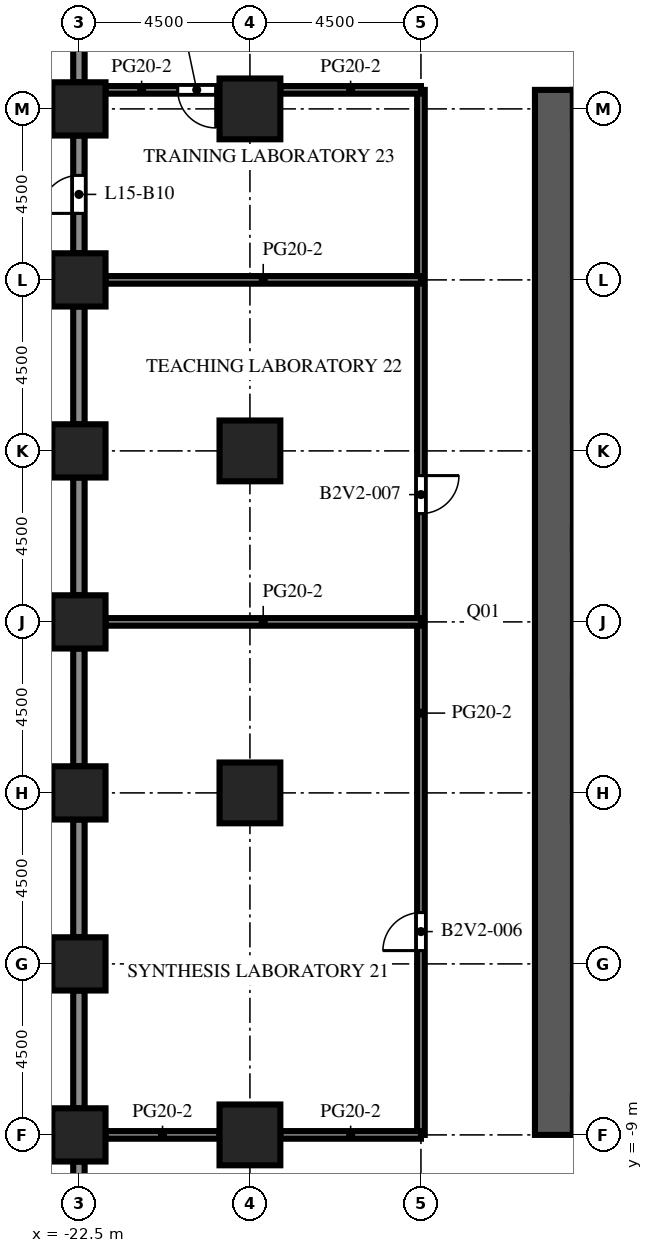
"""IFC4 building model, lengths in metres.
Left out: names, types, materials, properties, quantities, classifications, styles, units other than length and angle.
Written with IfcOpenShell. Run it as: python <this file> out.ifc"""

import sys

from ifc_helpers import new_model, si_unit, direction, frame, frame_2d, origin, origin_2d, place, context, subcontext, project, spatial, rectangle, extrude, element, fill, save


model = new_model("IFC4")
c1 = context("Model", 3, precision=1e-05, world=origin(), true_north=direction((0.0, 1.0)))
c2 = subcontext(c1, "Body", "Model", "MODEL_VIEW")
j1 = project(units=[si_unit("LENGTHUNIT", "METRE"), si_unit("PLANEANGLEUNIT", "RADIAN")], contexts=[c1])
p1 = place(None, origin())
s1 = spatial("IfcSite", under=j1, at=p1, CompositionType="ELEMENT")
p2 = place(p1, origin())
s2 = spatial("IfcBuilding", under=s1, at=p2, CompositionType="ELEMENT")
p3 = place(p2, frame((0.0, 0.0, 66.5)))
s3 = spatial("IfcBuildingStorey", under=s2, at=p3, CompositionType="ELEMENT", Elevation=66.5)
for number, where, z_axis, x_axis in (
    (1, (-22.5, -9.0, 0.0), (0.0, 0.0, 1.0), (1.0, 0.0, 0.0)),
    (2, (-22.5, -4.5, 0.0), (0.0, 0.0, 1.0), (1.0, 0.0, 0.0)),
    (3, (-22.5, 0.0, 0.0), (0.0, 0.0, 1.0), (1.0, 0.0, 0.0)),
    (4, (-22.5, 4.5, 0.0), (0.0, 0.0, 1.0), (1.0, 0.0, 0.0)),
    (5, (-22.5, 9.0, 0.0), (0.0, 0.0, 1.0), (1.0, 0.0, 0.0)),
    (6, (-22.5, 13.5, 0.0), (0.0, 0.0, 1.0), (1.0, 0.0, 0.0)),
    (7, (-22.5, 18.0, 0.0), (0.0, 0.0, 1.0), (1.0, 0.0, 0.0)),
):
    element("IfcColumn", number, at=place(p3, frame(where, z_axis=z_axis, x_axis=x_axis)), inside=s3, PredefinedType="COLUMN", context=c2, shape_type="SweptSolid", body=[
        extrude(rectangle(XDim=1.4, YDim=1.4, at=origin_2d()), origin(), (0.0, 0.0, 1.0), 4.1),
    ])
for number, where, z_axis, x_axis in (
    (8, (-18.0, -9.0, 0.0), (0.0, 0.0, 1.0), (1.0, 0.0, 0.0)),
    (9, (-18.0, 0.0, 0.0), (0.0, 0.0, 1.0), (1.0, 0.0, 0.0)),
    (10, (-18.0, 9.0, 0.0), (0.0, 0.0, 1.0), (1.0, 0.0, 0.0)),
    (11, (-18.0, 18.0, 0.0), (0.0, 0.0, 1.0), (1.0, 0.0, 0.0)),
):
    element("IfcColumn", number, at=place(p3, frame(where, z_axis=z_axis, x_axis=x_axis)), inside=s3, PredefinedType="COLUMN", context=c2, shape_type="SweptSolid", body=[
        extrude(rectangle(XDim=1.6, YDim=1.6, at=origin_2d()), origin(), (0.0, 0.0, 1.0), 4.1),
    ])
p4 = place(p3, frame((-10.0, -9.0, 0.0), z_axis=(0.0, 0.0, 1.0), x_axis=(0.0, 1.0, 0.0)))
e12 = element("IfcWall", 12, at=p4, inside=s3, PredefinedType="SHEAR", context=c2, shape_type="SweptSolid", body=[
    extrude(rectangle(XDim=27.5, YDim=1.0, at=frame_2d((13.75, 0.0))), origin(), (0.0, 0.0, 1.0), 4.1),
])
p5 = place(p4, frame((12.55, 0.0, 0.0)))
e13 = element("IfcOpeningElement", 13, at=p5, cuts=e12, PredefinedType="OPENING", context=c2, shape_type="SweptSolid", body=[
    extrude(rectangle(XDim=2.4, YDim=2.4, at=frame_2d((1.2, 1.2))), frame((0.0, 0.51, 0.0), z_axis=(0.0, -1.0, 0.0), x_axis=(1.0, 0.0, 0.0)), (0.0, 0.0, 1.0), 1.02),
])
p6 = place(p4, frame((6.825, 0.0, 0.0)))
e14 = element("IfcOpeningElement", 14, at=p6, cuts=e12, PredefinedType="OPENING", context=c2, shape_type="SweptSolid", body=[
    extrude(rectangle(XDim=1.2, YDim=2.1, at=frame_2d((0.6, 1.05))), frame((0.0, 0.51, 0.0), z_axis=(0.0, -1.0, 0.0), x_axis=(1.0, 0.0, 0.0)), (0.0, 0.0, 1.0), 1.02),
])
p7 = place(p4, frame((19.475, 0.0, 0.0)))
e15 = element("IfcOpeningElement", 15, at=p7, cuts=e12, PredefinedType="OPENING", context=c2, shape_type="SweptSolid", body=[
    extrude(rectangle(XDim=1.2, YDim=2.1, at=frame_2d((0.6, 1.05))), frame((0.0, 0.51, 0.0), z_axis=(0.0, -1.0, 0.0), x_axis=(1.0, 0.0, 0.0)), (0.0, 0.0, 1.0), 1.02),
])
p8 = place(p3, frame((-22.5, 18.7, 0.0), z_axis=(0.0, 0.0, 1.0), x_axis=(0.0, 1.0, 0.0)))
e16 = element("IfcWall", 16, at=p8, inside=s3, PredefinedType="SOLIDWALL", context=c2, shape_type="SweptSolid", body=[
    extrude(rectangle(XDim=3.1, YDim=0.3, at=frame_2d((1.55, 0.0))), origin(), (0.0, 0.0, 1.0), 2.6),
])
p9 = place(p3, frame((-22.5, 14.2, 0.0), z_axis=(0.0, 0.0, 1.0), x_axis=(0.0, 1.0, 0.0)))
e17 = element("IfcWall", 17, at=p9, inside=s3, PredefinedType="SOLIDWALL", context=c2, shape_type="SweptSolid", body=[
    extrude(rectangle(XDim=3.1, YDim=0.3, at=frame_2d((1.55, 0.0))), origin(), (0.0, 0.0, 1.0), 2.6),
])
p10 = place(p9, frame((1.05, 0.0, 0.0)))
e18 = element("IfcOpeningElement", 18, at=p10, cuts=e17, PredefinedType="OPENING", context=c2, shape_type="SweptSolid", body=[
    extrude(rectangle(XDim=1.0, YDim=2.2, at=frame_2d((0.5, 1.1))), frame((0.0, 0.16, 0.0), z_axis=(0.0, -1.0, 0.0), x_axis=(1.0, 0.0, 0.0)), (0.0, 0.0, 1.0), 0.32),
])
for number, where, z_axis, x_axis in (
    (19, (-22.5, 9.7, 0.0), (0.0, 0.0, 1.0), (0.0, 1.0, 0.0)),
    (20, (-22.5, 5.2, 0.0), (0.0, 0.0, 1.0), (0.0, 1.0, 0.0)),
    (21, (-22.5, 0.7, 0.0), (0.0, 0.0, 1.0), (0.0, 1.0, 0.0)),
    (22, (-22.5, -3.8, 0.0), (0.0, 0.0, 1.0), (0.0, 1.0, 0.0)),
    (23, (-22.5, -8.3, 0.0), (0.0, 0.0, 1.0), (0.0, 1.0, 0.0)),
    (24, (-22.5, -12.8, 0.0), (0.0, 0.0, 1.0), (0.0, 1.0, 0.0)),
):
    element("IfcWall", number, at=place(p3, frame(where, z_axis=z_axis, x_axis=x_axis)), inside=s3, PredefinedType="SOLIDWALL", context=c2, shape_type="SweptSolid", body=[
        extrude(rectangle(XDim=3.1, YDim=0.3, at=frame_2d((1.55, 0.0))), origin(), (0.0, 0.0, 1.0), 2.6),
    ])
p11 = place(p3, frame((-13.5, -9.0, 0.0), z_axis=(0.0, 0.0, 1.0), x_axis=(0.0, 1.0, 0.0)))
e25 = element("IfcWall", 25, at=p11, inside=s3, PredefinedType="PARTITIONING", context=c2, shape_type="SweptSolid", body=[
    extrude(rectangle(XDim=27.5, YDim=0.2, at=frame_2d((13.75, 0.0))), origin(), (0.0, 0.0, 1.0), 3.5),
])
p12 = place(p11, frame((4.85, 0.0, 0.0)))
e26 = element("IfcOpeningElement", 26, at=p12, cuts=e25, PredefinedType="OPENING", context=c2, shape_type="SweptSolid", body=[
    extrude(rectangle(XDim=1.0, YDim=2.1, at=frame_2d((0.5, 1.05))), frame((0.0, 0.11, 0.0), z_axis=(0.0, -1.0, 0.0), x_axis=(1.0, 0.0, 0.0)), (0.0, 0.0, 1.0), 0.22),
])
p13 = place(p11, frame((16.35, 0.0, 0.0)))
e27 = element("IfcOpeningElement", 27, at=p13, cuts=e25, PredefinedType="OPENING", context=c2, shape_type="SweptSolid", body=[
    extrude(rectangle(XDim=1.0, YDim=2.1, at=frame_2d((0.5, 1.05))), frame((0.0, 0.11, 0.0), z_axis=(0.0, -1.0, 0.0), x_axis=(1.0, 0.0, 0.0)), (0.0, 0.0, 1.0), 0.22),
])
p14 = place(p3, frame((-21.8, -9.0, 0.0), z_axis=(0.0, 0.0, 1.0), x_axis=(1.0, 0.0, 0.0)))
e28 = element("IfcWall", 28, at=p14, inside=s3, PredefinedType="PARTITIONING", context=c2, shape_type="SweptSolid", body=[
    extrude(rectangle(XDim=3.0, YDim=0.2, at=frame_2d((1.5, 0.0))), origin(), (0.0, 0.0, 1.0), 3.5),
])
p15 = place(p3, frame((-17.2, -9.0, 0.0), z_axis=(0.0, 0.0, 1.0), x_axis=(1.0, 0.0, 0.0)))
e29 = element("IfcWall", 29, at=p15, inside=s3, PredefinedType="PARTITIONING", context=c2, shape_type="SweptSolid", body=[
    extrude(rectangle(XDim=3.7, YDim=0.2, at=frame_2d((1.85, 0.0))), origin(), (0.0, 0.0, 1.0), 3.5),
])
for number, where, z_axis, x_axis in (
    (30, (-21.8, 4.5, 0.0), (0.0, 0.0, 1.0), (1.0, 0.0, 0.0)),
    (31, (-21.8, 13.5, 0.0), (0.0, 0.0, 1.0), (1.0, 0.0, 0.0)),
):
    element("IfcWall", number, at=place(p3, frame(where, z_axis=z_axis, x_axis=x_axis)), inside=s3, PredefinedType="PARTITIONING", context=c2, shape_type="SweptSolid", body=[
        extrude(rectangle(XDim=8.3, YDim=0.2, at=frame_2d((4.15, 0.0))), origin(), (0.0, 0.0, 1.0), 3.5),
    ])
p16 = place(p3, frame((-18.8, 18.5, 0.0), z_axis=(0.0, 0.0, 1.0), x_axis=(-1.0, 0.0, 0.0)))
e32 = element("IfcWall", 32, at=p16, inside=s3, PredefinedType="PARTITIONING", context=c2, shape_type="SweptSolid", body=[
    extrude(rectangle(XDim=3.0, YDim=0.2, at=frame_2d((1.5, 0.0))), origin(), (0.0, 0.0, 1.0), 3.5),
])
p17 = place(p16, frame((0.1, 0.0, 0.0)))
e33 = element("IfcOpeningElement", 33, at=p17, cuts=e32, PredefinedType="OPENING", context=c2, shape_type="SweptSolid", body=[
    extrude(rectangle(XDim=1.0, YDim=2.1, at=frame_2d((0.5, 1.05))), frame((0.0, 0.11, 0.0), z_axis=(0.0, -1.0, 0.0), x_axis=(1.0, 0.0, 0.0)), (0.0, 0.0, 1.0), 0.22),
])
p18 = place(p3, frame((-17.2, 18.5, 0.0), z_axis=(0.0, 0.0, 1.0), x_axis=(1.0, 0.0, 0.0)))
e34 = element("IfcWall", 34, at=p18, inside=s3, PredefinedType="PARTITIONING", context=c2, shape_type="SweptSolid", body=[
    extrude(rectangle(XDim=3.7, YDim=0.2, at=frame_2d((1.85, 0.0))), origin(), (0.0, 0.0, 1.0), 3.5),
])
p19 = place(p10, origin())
e35 = element("IfcDoor", 35, at=p19, inside=s3, OperationType="SINGLE_SWING_LEFT", PredefinedType="DOOR", context=c2, shape_type="SweptSolid", body=[
    extrude(rectangle(XDim=1.0, YDim=2.2, at=frame_2d((0.5, 1.1))), frame((0.0, 0.025, 0.0), z_axis=(0.0, -1.0, 0.0), x_axis=(1.0, 0.0, 0.0)), (0.0, 0.0, 1.0), 0.05),
])
fill(e18, e35)
p20 = place(p5, origin())
e36 = element("IfcDoor", 36, at=p20, inside=s3, OperationType="DOUBLE_DOOR_DOUBLE_SWING", PredefinedType="DOOR", context=c2, shape_type="SweptSolid", body=[
    extrude(rectangle(XDim=2.4, YDim=2.4, at=frame_2d((1.2, 1.2))), frame((0.0, 0.025, 0.0), z_axis=(0.0, -1.0, 0.0), x_axis=(1.0, 0.0, 0.0)), (0.0, 0.0, 1.0), 0.05),
])
fill(e13, e36)
p21 = place(p6, origin())
e37 = element("IfcDoor", 37, at=p21, inside=s3, OperationType="SINGLE_SWING_LEFT", PredefinedType="DOOR", context=c2, shape_type="SweptSolid", body=[
    extrude(rectangle(XDim=1.2, YDim=2.1, at=frame_2d((0.6, 1.05))), frame((0.0, 0.025, 0.0), z_axis=(0.0, -1.0, 0.0), x_axis=(1.0, 0.0, 0.0)), (0.0, 0.0, 1.0), 0.05),
])
fill(e14, e37)
p22 = place(p7, origin())
e38 = element("IfcDoor", 38, at=p22, inside=s3, OperationType="SINGLE_SWING_LEFT", PredefinedType="DOOR", context=c2, shape_type="SweptSolid", body=[
    extrude(rectangle(XDim=1.2, YDim=2.1, at=frame_2d((0.6, 1.05))), frame((0.0, 0.025, 0.0), z_axis=(0.0, -1.0, 0.0), x_axis=(1.0, 0.0, 0.0)), (0.0, 0.0, 1.0), 0.05),
])
fill(e15, e38)
p23 = place(p12, origin())
e39 = element("IfcDoor", 39, at=p23, inside=s3, OperationType="SINGLE_SWING_LEFT", PredefinedType="DOOR", context=c2, shape_type="SweptSolid", body=[
    extrude(rectangle(XDim=1.0, YDim=2.1, at=frame_2d((0.5, 1.05))), frame((0.0, 0.025, 0.0), z_axis=(0.0, -1.0, 0.0), x_axis=(1.0, 0.0, 0.0)), (0.0, 0.0, 1.0), 0.05),
])
fill(e26, e39)
p24 = place(p13, origin())
e40 = element("IfcDoor", 40, at=p24, inside=s3, OperationType="SINGLE_SWING_RIGHT", PredefinedType="DOOR", context=c2, shape_type="SweptSolid", body=[
    extrude(rectangle(XDim=1.0, YDim=2.1, at=frame_2d((0.5, 1.05))), frame((0.0, 0.025, 0.0), z_axis=(0.0, -1.0, 0.0), x_axis=(1.0, 0.0, 0.0)), (0.0, 0.0, 1.0), 0.05),
])
fill(e27, e40)
p25 = place(p17, origin())
e41 = element("IfcDoor", 41, at=p25, inside=s3, OperationType="SINGLE_SWING_LEFT", PredefinedType="DOOR", context=c2, shape_type="SweptSolid", body=[
    extrude(rectangle(XDim=1.0, YDim=2.1, at=frame_2d((0.5, 1.05))), frame((0.0, 0.025, 0.0), z_axis=(0.0, -1.0, 0.0), x_axis=(1.0, 0.0, 0.0)), (0.0, 0.0, 1.0), 0.05),
])
fill(e33, e41)
save(model, sys.argv[1])
